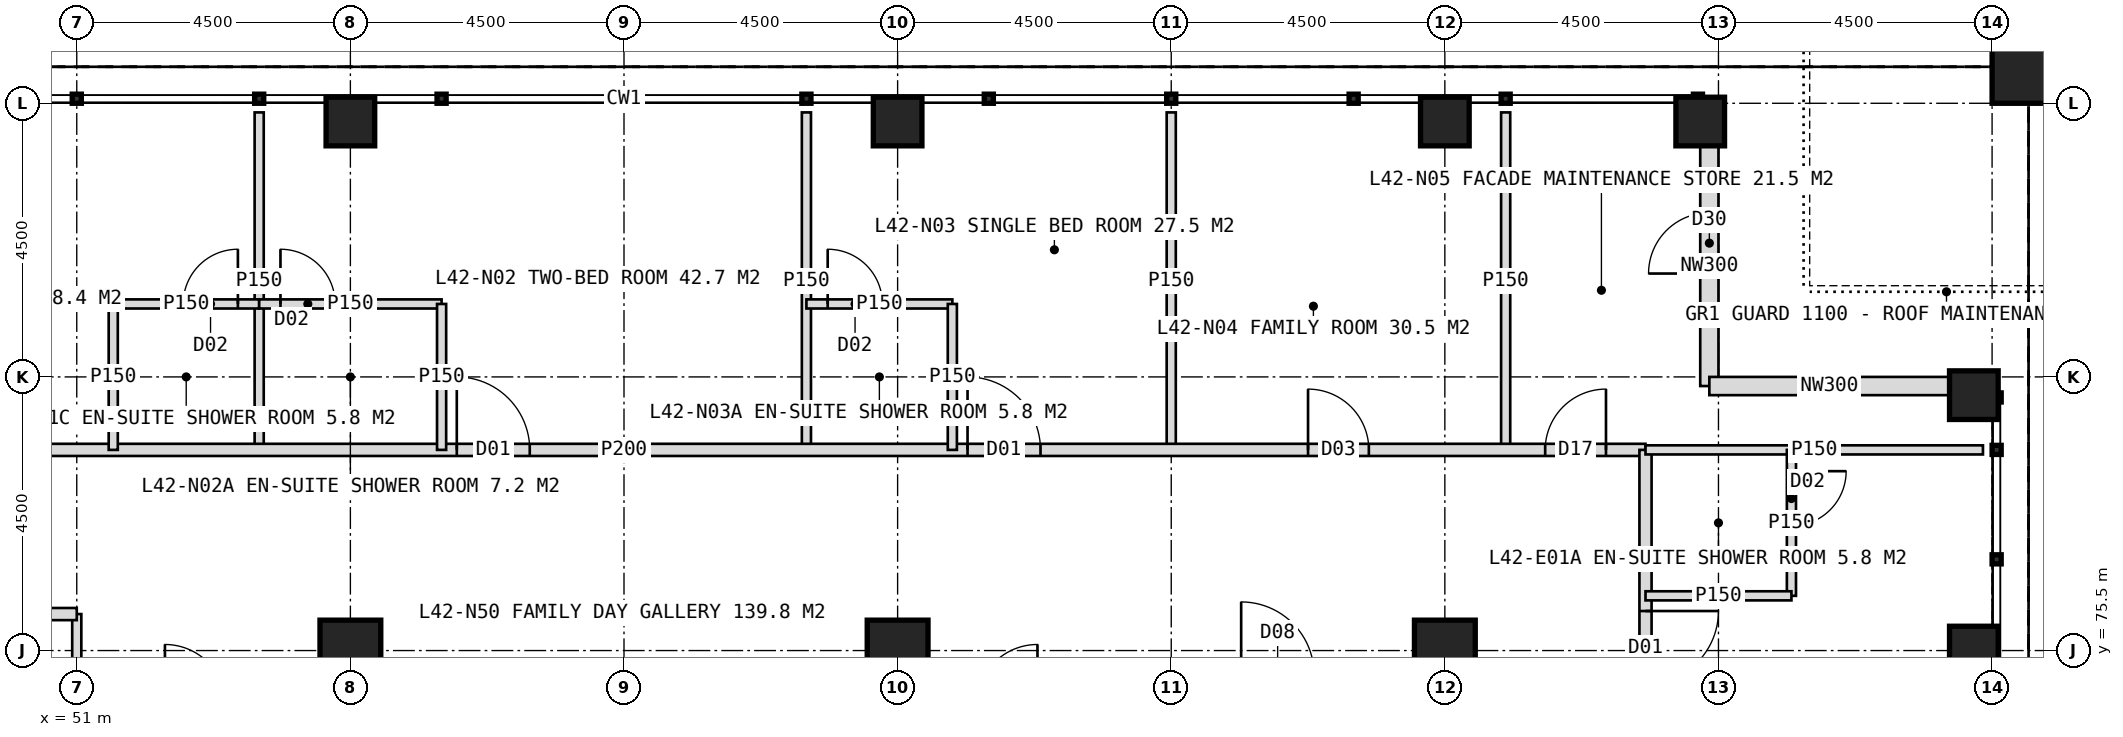
"""IFC4 building model, lengths in metres.
Left out: names, types, materials, properties, quantities, classifications, styles, units other than length and angle.
Written with IfcOpenShell. Run it as: python <this file> out.ifc"""

import sys

from ifc_helpers import new_model, si_unit, direction, frame, frame_2d, origin, origin_2d, place, context, subcontext, project, spatial, rectangle, hollow_rectangle, extrude, element, fill, save


model = new_model("IFC4")
c1 = context("Model", 3, precision=1e-05, world=origin(), true_north=direction((0.0, 1.0)))
c2 = subcontext(c1, "Body", "Model", "MODEL_VIEW")
j1 = project(units=[si_unit("LENGTHUNIT", "METRE"), si_unit("PLANEANGLEUNIT", "RADIAN")], contexts=[c1])
p1 = place(None, origin())
s1 = spatial("IfcSite", under=j1, at=p1, CompositionType="ELEMENT")
p2 = place(p1, origin())
s2 = spatial("IfcBuilding", under=s1, at=p2, CompositionType="ELEMENT")
p3 = place(p2, frame((0.0, 0.0, 177.0)))
s3 = spatial("IfcBuildingStorey", under=s2, at=p3, CompositionType="ELEMENT", Elevation=177.0)
for number, where, z_axis, x_axis in (
    (1, (73.5, 75.5, 0.0), (0.0, 0.0, 1.0), (1.0, 0.0, 0.0)),
    (2, (55.5, 75.5, 0.0), (0.0, 0.0, 1.0), (1.0, 0.0, 0.0)),
    (3, (64.5, 75.5, 0.0), (0.0, 0.0, 1.0), (1.0, 0.0, 0.0)),
):
    element("IfcColumn", number, at=place(p3, frame(where, z_axis=z_axis, x_axis=x_axis)), inside=s3, PredefinedType="COLUMN", context=c2, shape_type="SweptSolid", body=[
        extrude(hollow_rectangle(XDim=1.0, YDim=1.0, WallThickness=0.1, at=origin_2d()), origin(), (0.0, 0.0, 1.0), 4.0),
    ])
for number, where, z_axis, x_axis in (
    (4, (55.5, 84.2, 0.0), (0.0, 0.0, 1.0), (1.0, 0.0, 0.0)),
    (5, (64.5, 84.2, 0.0), (0.0, 0.0, 1.0), (1.0, 0.0, 0.0)),
    (6, (73.5, 84.2, 0.0), (0.0, 0.0, 1.0), (1.0, 0.0, 0.0)),
    (7, (82.2, 75.5, 0.0), (0.0, 0.0, 1.0), (1.0, 0.0, 0.0)),
    (8, (77.7, 84.2, 0.0), (0.0, 0.0, 1.0), (1.0, 0.0, 0.0)),
    (9, (82.2, 79.7, 0.0), (0.0, 0.0, 1.0), (1.0, 0.0, 0.0)),
):
    element("IfcColumn", number, at=place(p3, frame(where, z_axis=z_axis, x_axis=x_axis)), inside=s3, PredefinedType="COLUMN", context=c2, shape_type="SweptSolid", body=[
        extrude(hollow_rectangle(XDim=0.8, YDim=0.8, WallThickness=0.08, at=origin_2d()), origin(), (0.0, 0.0, 1.0), 4.0),
    ])
p4 = place(p3, frame((83.1, 85.1, 2.0), z_axis=(0.0, 0.0, 1.0), x_axis=(1.0, 0.0, 0.0)))
e10 = element("IfcColumn", 10, at=p4, inside=s3, PredefinedType="COLUMN", context=c2, shape_type="SweptSolid", body=[
    extrude(hollow_rectangle(XDim=1.2, YDim=1.2, WallThickness=0.07, at=origin_2d()), origin(), (0.0, 0.0, 1.0), 2.0),
])
p5 = place(p3, frame((77.85, 83.8, 0.0), z_axis=(0.0, 0.0, 1.0), x_axis=(0.0, -1.0, 0.0)))
e11 = element("IfcWall", 11, at=p5, inside=s3, PredefinedType="ELEMENTEDWALL", context=c2, shape_type="SweptSolid", body=[
    extrude(rectangle(XDim=3.95, YDim=0.3, at=frame_2d((1.975, 0.0))), origin(), (0.0, 0.0, 1.0), 2.85),
])
p6 = place(p5, frame((1.1, 0.0, 0.0)))
e12 = element("IfcOpeningElement", 12, at=p6, cuts=e11, PredefinedType="OPENING", context=c2, shape_type="SweptSolid", body=[
    extrude(rectangle(XDim=1.0, YDim=2.1, at=frame_2d((0.5, 1.05))), frame((0.0, 0.16, 0.0), z_axis=(0.0, -1.0, 0.0), x_axis=(1.0, 0.0, 0.0)), (0.0, 0.0, 1.0), 0.32),
])
p7 = place(p3, frame((77.85, 79.85, 0.0), z_axis=(0.0, 0.0, 1.0), x_axis=(1.0, 0.0, 0.0)))
e13 = element("IfcWall", 13, at=p7, inside=s3, PredefinedType="ELEMENTEDWALL", context=c2, shape_type="SweptSolid", body=[
    extrude(rectangle(XDim=3.95, YDim=0.3, at=frame_2d((1.975, 0.0))), origin(), (0.0, 0.0, 1.0), 2.85),
])
for number, where, z_axis, x_axis in (
    (14, (54.0, 78.8, 0.0), (0.0, 0.0, 1.0), (0.0, 1.0, 0.0)),
    (15, (63.0, 78.8, 0.0), (0.0, 0.0, 1.0), (0.0, 1.0, 0.0)),
    (16, (69.0, 78.8, 0.0), (0.0, 0.0, 1.0), (0.0, 1.0, 0.0)),
    (17, (74.5, 78.8, 0.0), (0.0, 0.0, 1.0), (0.0, 1.0, 0.0)),
):
    element("IfcWall", number, at=place(p3, frame(where, z_axis=z_axis, x_axis=x_axis)), inside=s3, PredefinedType="PARTITIONING", context=c2, shape_type="SweptSolid", body=[
        extrude(rectangle(XDim=5.55, YDim=0.15, at=frame_2d((2.775, 0.0))), origin(), (0.0, 0.0, 1.0), 3.75),
    ])
p8 = place(p3, frame((43.2, 78.8, 0.0), z_axis=(0.0, 0.0, 1.0), x_axis=(1.0, 0.0, 0.0)))
e18 = element("IfcWall", 18, at=p8, inside=s3, PredefinedType="PARTITIONING", context=c2, shape_type="SweptSolid", body=[
    extrude(rectangle(XDim=33.6, YDim=0.2, at=frame_2d((16.8, 0.0))), origin(), (0.0, 0.0, 1.0), 3.75),
])
p9 = place(p8, frame((2.65, 0.0, 0.0)))
e19 = element("IfcOpeningElement", 19, at=p9, cuts=e18, PredefinedType="OPENING", context=c2, shape_type="SweptSolid", body=[
    extrude(rectangle(XDim=1.2, YDim=2.2, at=frame_2d((0.6, 1.1))), frame((0.0, 0.11, 0.0), z_axis=(0.0, -1.0, 0.0), x_axis=(1.0, 0.0, 0.0)), (0.0, 0.0, 1.0), 0.22),
])
p10 = place(p8, frame((14.05, 0.0, 0.0)))
e20 = element("IfcOpeningElement", 20, at=p10, cuts=e18, PredefinedType="OPENING", context=c2, shape_type="SweptSolid", body=[
    extrude(rectangle(XDim=1.2, YDim=2.2, at=frame_2d((0.6, 1.1))), frame((0.0, 0.11, 0.0), z_axis=(0.0, -1.0, 0.0), x_axis=(1.0, 0.0, 0.0)), (0.0, 0.0, 1.0), 0.22),
])
p11 = place(p8, frame((22.45, 0.0, 0.0)))
e21 = element("IfcOpeningElement", 21, at=p11, cuts=e18, PredefinedType="OPENING", context=c2, shape_type="SweptSolid", body=[
    extrude(rectangle(XDim=1.2, YDim=2.2, at=frame_2d((0.6, 1.1))), frame((0.0, 0.11, 0.0), z_axis=(0.0, -1.0, 0.0), x_axis=(1.0, 0.0, 0.0)), (0.0, 0.0, 1.0), 0.22),
])
p12 = place(p8, frame((28.05, 0.0, 0.0)))
e22 = element("IfcOpeningElement", 22, at=p12, cuts=e18, PredefinedType="OPENING", context=c2, shape_type="SweptSolid", body=[
    extrude(rectangle(XDim=1.0, YDim=2.1, at=frame_2d((0.5, 1.05))), frame((0.0, 0.11, 0.0), z_axis=(0.0, -1.0, 0.0), x_axis=(1.0, 0.0, 0.0)), (0.0, 0.0, 1.0), 0.22),
])
p13 = place(p8, frame((31.95, 0.0, 0.0)))
e23 = element("IfcOpeningElement", 23, at=p13, cuts=e18, PredefinedType="OPENING", context=c2, shape_type="SweptSolid", body=[
    extrude(rectangle(XDim=1.0, YDim=2.1, at=frame_2d((0.5, 1.05))), frame((0.0, 0.11, 0.0), z_axis=(0.0, -1.0, 0.0), x_axis=(1.0, 0.0, 0.0)), (0.0, 0.0, 1.0), 0.22),
])
p14 = place(p3, frame((51.6, 81.2, 0.0), z_axis=(0.0, 0.0, 1.0), x_axis=(1.0, 0.0, 0.0)))
e24 = element("IfcWall", 24, at=p14, inside=s3, PredefinedType="PARTITIONING", context=c2, shape_type="SweptSolid", body=[
    extrude(rectangle(XDim=2.4, YDim=0.15, at=frame_2d((1.2, 0.0))), origin(), (0.0, 0.0, 1.0), 3.75),
])
p15 = place(p14, frame((1.15, 0.0, 0.0)))
e25 = element("IfcOpeningElement", 25, at=p15, cuts=e24, PredefinedType="OPENING", context=c2, shape_type="SweptSolid", body=[
    extrude(rectangle(XDim=0.9, YDim=2.1, at=frame_2d((0.45, 1.05))), frame((0.0, 0.085, 0.0), z_axis=(0.0, -1.0, 0.0), x_axis=(1.0, 0.0, 0.0)), (0.0, 0.0, 1.0), 0.17),
])
p16 = place(p3, frame((51.6, 78.8, 0.0), z_axis=(0.0, 0.0, 1.0), x_axis=(0.0, 1.0, 0.0)))
e26 = element("IfcWall", 26, at=p16, inside=s3, PredefinedType="PARTITIONING", context=c2, shape_type="SweptSolid", body=[
    extrude(rectangle(XDim=2.4, YDim=0.15, at=frame_2d((1.2, 0.0))), origin(), (0.0, 0.0, 1.0), 3.75),
])
p17 = place(p3, frame((54.0, 81.2, 0.0), z_axis=(0.0, 0.0, 1.0), x_axis=(1.0, 0.0, 0.0)))
e27 = element("IfcWall", 27, at=p17, inside=s3, PredefinedType="PARTITIONING", context=c2, shape_type="SweptSolid", body=[
    extrude(rectangle(XDim=3.0, YDim=0.15, at=frame_2d((1.5, 0.0))), origin(), (0.0, 0.0, 1.0), 3.75),
])
p18 = place(p17, frame((0.35, 0.0, 0.0)))
e28 = element("IfcOpeningElement", 28, at=p18, cuts=e27, PredefinedType="OPENING", context=c2, shape_type="SweptSolid", body=[
    extrude(rectangle(XDim=0.9, YDim=2.1, at=frame_2d((0.45, 1.05))), frame((0.0, 0.085, 0.0), z_axis=(0.0, -1.0, 0.0), x_axis=(1.0, 0.0, 0.0)), (0.0, 0.0, 1.0), 0.17),
])
p19 = place(p3, frame((57.0, 78.8, 0.0), z_axis=(0.0, 0.0, 1.0), x_axis=(0.0, 1.0, 0.0)))
e29 = element("IfcWall", 29, at=p19, inside=s3, PredefinedType="PARTITIONING", context=c2, shape_type="SweptSolid", body=[
    extrude(rectangle(XDim=2.4, YDim=0.15, at=frame_2d((1.2, 0.0))), origin(), (0.0, 0.0, 1.0), 3.75),
])
p20 = place(p3, frame((63.0, 81.2, 0.0), z_axis=(0.0, 0.0, 1.0), x_axis=(1.0, 0.0, 0.0)))
e30 = element("IfcWall", 30, at=p20, inside=s3, PredefinedType="PARTITIONING", context=c2, shape_type="SweptSolid", body=[
    extrude(rectangle(XDim=2.4, YDim=0.15, at=frame_2d((1.2, 0.0))), origin(), (0.0, 0.0, 1.0), 3.75),
])
p21 = place(p20, frame((0.35, 0.0, 0.0)))
e31 = element("IfcOpeningElement", 31, at=p21, cuts=e30, PredefinedType="OPENING", context=c2, shape_type="SweptSolid", body=[
    extrude(rectangle(XDim=0.9, YDim=2.1, at=frame_2d((0.45, 1.05))), frame((0.0, 0.085, 0.0), z_axis=(0.0, -1.0, 0.0), x_axis=(1.0, 0.0, 0.0)), (0.0, 0.0, 1.0), 0.17),
])
p22 = place(p3, frame((65.4, 78.8, 0.0), z_axis=(0.0, 0.0, 1.0), x_axis=(0.0, 1.0, 0.0)))
e32 = element("IfcWall", 32, at=p22, inside=s3, PredefinedType="PARTITIONING", context=c2, shape_type="SweptSolid", body=[
    extrude(rectangle(XDim=2.4, YDim=0.15, at=frame_2d((1.2, 0.0))), origin(), (0.0, 0.0, 1.0), 3.75),
])
p23 = place(p3, frame((51.0, 71.0, 0.0), z_axis=(0.0, 0.0, 1.0), x_axis=(0.0, 1.0, 0.0)))
e33 = element("IfcWall", 33, at=p23, inside=s3, PredefinedType="PARTITIONING", context=c2, shape_type="SweptSolid", body=[
    extrude(rectangle(XDim=5.1, YDim=0.15, at=frame_2d((2.55, 0.0))), origin(), (0.0, 0.0, 1.0), 3.75),
])
p24 = place(p3, frame((45.9, 76.1, 0.0), z_axis=(0.0, 0.0, 1.0), x_axis=(1.0, 0.0, 0.0)))
e34 = element("IfcWall", 34, at=p24, inside=s3, PredefinedType="PARTITIONING", context=c2, shape_type="SweptSolid", body=[
    extrude(rectangle(XDim=5.1, YDim=0.2, at=frame_2d((2.55, 0.0))), origin(), (0.0, 0.0, 1.0), 3.75),
])
p25 = place(p3, frame((76.8, 78.8, 0.0), z_axis=(0.0, 0.0, 1.0), x_axis=(0.0, -1.0, 0.0)))
e35 = element("IfcWall", 35, at=p25, inside=s3, PredefinedType="PARTITIONING", context=c2, shape_type="SweptSolid", body=[
    extrude(rectangle(XDim=33.6, YDim=0.2, at=frame_2d((16.8, 0.0))), origin(), (0.0, 0.0, 1.0), 3.75),
])
p26 = place(p25, frame((2.65, 0.0, 0.0)))
e36 = element("IfcOpeningElement", 36, at=p26, cuts=e35, PredefinedType="OPENING", context=c2, shape_type="SweptSolid", body=[
    extrude(rectangle(XDim=1.2, YDim=2.2, at=frame_2d((0.6, 1.1))), frame((0.0, 0.11, 0.0), z_axis=(0.0, -1.0, 0.0), x_axis=(1.0, 0.0, 0.0)), (0.0, 0.0, 1.0), 0.22),
])
p27 = place(p25, frame((7.45, 0.0, 0.0)))
e37 = element("IfcOpeningElement", 37, at=p27, cuts=e35, PredefinedType="OPENING", context=c2, shape_type="SweptSolid", body=[
    extrude(rectangle(XDim=1.2, YDim=2.2, at=frame_2d((0.6, 1.1))), frame((0.0, 0.11, 0.0), z_axis=(0.0, -1.0, 0.0), x_axis=(1.0, 0.0, 0.0)), (0.0, 0.0, 1.0), 0.22),
])
p28 = place(p25, frame((13.45, 0.0, 0.0)))
e38 = element("IfcOpeningElement", 38, at=p28, cuts=e35, PredefinedType="OPENING", context=c2, shape_type="SweptSolid", body=[
    extrude(rectangle(XDim=1.2, YDim=2.2, at=frame_2d((0.6, 1.1))), frame((0.0, 0.11, 0.0), z_axis=(0.0, -1.0, 0.0), x_axis=(1.0, 0.0, 0.0)), (0.0, 0.0, 1.0), 0.22),
])
p29 = place(p25, frame((19.45, 0.0, 0.0)))
e39 = element("IfcOpeningElement", 39, at=p29, cuts=e35, PredefinedType="OPENING", context=c2, shape_type="SweptSolid", body=[
    extrude(rectangle(XDim=1.2, YDim=2.2, at=frame_2d((0.6, 1.1))), frame((0.0, 0.11, 0.0), z_axis=(0.0, -1.0, 0.0), x_axis=(1.0, 0.0, 0.0)), (0.0, 0.0, 1.0), 0.22),
])
p30 = place(p25, frame((25.45, 0.0, 0.0)))
e40 = element("IfcOpeningElement", 40, at=p30, cuts=e35, PredefinedType="OPENING", context=c2, shape_type="SweptSolid", body=[
    extrude(rectangle(XDim=1.2, YDim=2.2, at=frame_2d((0.6, 1.1))), frame((0.0, 0.11, 0.0), z_axis=(0.0, -1.0, 0.0), x_axis=(1.0, 0.0, 0.0)), (0.0, 0.0, 1.0), 0.22),
])
p31 = place(p3, frame((76.8, 78.8, 0.0), z_axis=(0.0, 0.0, 1.0), x_axis=(1.0, 0.0, 0.0)))
e41 = element("IfcWall", 41, at=p31, inside=s3, PredefinedType="PARTITIONING", context=c2, shape_type="SweptSolid", body=[
    extrude(rectangle(XDim=5.55, YDim=0.15, at=frame_2d((2.775, 0.0))), origin(), (0.0, 0.0, 1.0), 3.75),
])
p32 = place(p3, frame((79.2, 78.8, 0.0), z_axis=(0.0, 0.0, 1.0), x_axis=(0.0, -1.0, 0.0)))
e42 = element("IfcWall", 42, at=p32, inside=s3, PredefinedType="PARTITIONING", context=c2, shape_type="SweptSolid", body=[
    extrude(rectangle(XDim=2.4, YDim=0.15, at=frame_2d((1.2, 0.0))), origin(), (0.0, 0.0, 1.0), 3.75),
])
p33 = place(p32, frame((0.35, 0.0, 0.0)))
e43 = element("IfcOpeningElement", 43, at=p33, cuts=e42, PredefinedType="OPENING", context=c2, shape_type="SweptSolid", body=[
    extrude(rectangle(XDim=0.9, YDim=2.1, at=frame_2d((0.45, 1.05))), frame((0.0, 0.085, 0.0), z_axis=(0.0, -1.0, 0.0), x_axis=(1.0, 0.0, 0.0)), (0.0, 0.0, 1.0), 0.17),
])
p34 = place(p3, frame((76.8, 76.4, 0.0), z_axis=(0.0, 0.0, 1.0), x_axis=(1.0, 0.0, 0.0)))
e44 = element("IfcWall", 44, at=p34, inside=s3, PredefinedType="PARTITIONING", context=c2, shape_type="SweptSolid", body=[
    extrude(rectangle(XDim=2.4, YDim=0.15, at=frame_2d((1.2, 0.0))), origin(), (0.0, 0.0, 1.0), 3.75),
])
p35 = place(p15, origin())
e45 = element("IfcDoor", 45, at=p35, inside=s3, OperationType="SINGLE_SWING_RIGHT", PredefinedType="DOOR", context=c2, shape_type="SweptSolid", body=[
    extrude(rectangle(XDim=0.9, YDim=2.1, at=frame_2d((0.45, 1.05))), frame((0.0, 0.025, 0.0), z_axis=(0.0, -1.0, 0.0), x_axis=(1.0, 0.0, 0.0)), (0.0, 0.0, 1.0), 0.05),
])
fill(e25, e45)
p36 = place(p10, origin())
e46 = element("IfcDoor", 46, at=p36, inside=s3, OperationType="SINGLE_SWING_LEFT", PredefinedType="DOOR", context=c2, shape_type="SweptSolid", body=[
    extrude(rectangle(XDim=1.2, YDim=2.2, at=frame_2d((0.6, 1.1))), frame((0.0, 0.025, 0.0), z_axis=(0.0, -1.0, 0.0), x_axis=(1.0, 0.0, 0.0)), (0.0, 0.0, 1.0), 0.05),
])
fill(e20, e46)
p37 = place(p18, origin())
e47 = element("IfcDoor", 47, at=p37, inside=s3, OperationType="SINGLE_SWING_LEFT", PredefinedType="DOOR", context=c2, shape_type="SweptSolid", body=[
    extrude(rectangle(XDim=0.9, YDim=2.1, at=frame_2d((0.45, 1.05))), frame((0.0, 0.025, 0.0), z_axis=(0.0, -1.0, 0.0), x_axis=(1.0, 0.0, 0.0)), (0.0, 0.0, 1.0), 0.05),
])
fill(e28, e47)
p38 = place(p11, origin())
e48 = element("IfcDoor", 48, at=p38, inside=s3, OperationType="SINGLE_SWING_LEFT", PredefinedType="DOOR", context=c2, shape_type="SweptSolid", body=[
    extrude(rectangle(XDim=1.2, YDim=2.2, at=frame_2d((0.6, 1.1))), frame((0.0, 0.025, 0.0), z_axis=(0.0, -1.0, 0.0), x_axis=(1.0, 0.0, 0.0)), (0.0, 0.0, 1.0), 0.05),
])
fill(e21, e48)
p39 = place(p21, origin())
e49 = element("IfcDoor", 49, at=p39, inside=s3, OperationType="SINGLE_SWING_LEFT", PredefinedType="DOOR", context=c2, shape_type="SweptSolid", body=[
    extrude(rectangle(XDim=0.9, YDim=2.1, at=frame_2d((0.45, 1.05))), frame((0.0, 0.025, 0.0), z_axis=(0.0, -1.0, 0.0), x_axis=(1.0, 0.0, 0.0)), (0.0, 0.0, 1.0), 0.05),
])
fill(e31, e49)
p40 = place(p12, origin())
e50 = element("IfcDoor", 50, at=p40, inside=s3, OperationType="SINGLE_SWING_LEFT", PredefinedType="DOOR", context=c2, shape_type="SweptSolid", body=[
    extrude(rectangle(XDim=1.0, YDim=2.1, at=frame_2d((0.5, 1.05))), frame((0.0, 0.025, 0.0), z_axis=(0.0, -1.0, 0.0), x_axis=(1.0, 0.0, 0.0)), (0.0, 0.0, 1.0), 0.05),
])
fill(e22, e50)
p41 = place(p13, origin())
e51 = element("IfcDoor", 51, at=p41, inside=s3, OperationType="SINGLE_SWING_RIGHT", PredefinedType="DOOR", context=c2, shape_type="SweptSolid", body=[
    extrude(rectangle(XDim=1.0, YDim=2.1, at=frame_2d((0.5, 1.05))), frame((0.0, 0.025, 0.0), z_axis=(0.0, -1.0, 0.0), x_axis=(1.0, 0.0, 0.0)), (0.0, 0.0, 1.0), 0.05),
])
fill(e23, e51)
p42 = place(p26, origin())
e52 = element("IfcDoor", 52, at=p42, inside=s3, OperationType="SINGLE_SWING_LEFT", PredefinedType="DOOR", context=c2, shape_type="SweptSolid", body=[
    extrude(rectangle(XDim=1.2, YDim=2.2, at=frame_2d((0.6, 1.1))), frame((0.0, 0.025, 0.0), z_axis=(0.0, -1.0, 0.0), x_axis=(1.0, 0.0, 0.0)), (0.0, 0.0, 1.0), 0.05),
])
fill(e36, e52)
p43 = place(p33, origin())
e53 = element("IfcDoor", 53, at=p43, inside=s3, OperationType="SINGLE_SWING_LEFT", PredefinedType="DOOR", context=c2, shape_type="SweptSolid", body=[
    extrude(rectangle(XDim=0.9, YDim=2.1, at=frame_2d((0.45, 1.05))), frame((0.0, 0.025, 0.0), z_axis=(0.0, -1.0, 0.0), x_axis=(1.0, 0.0, 0.0)), (0.0, 0.0, 1.0), 0.05),
])
fill(e43, e53)
p44 = place(p6, frame((1.0, 0.0, 0.0), z_axis=(0.0, 0.0, 1.0), x_axis=(-1.0, 0.0, 0.0)))
e54 = element("IfcDoor", 54, at=p44, inside=s3, OperationType="SINGLE_SWING_LEFT", PredefinedType="DOOR", context=c2, shape_type="SweptSolid", body=[
    extrude(rectangle(XDim=1.0, YDim=2.1, at=frame_2d((0.5, 1.05))), frame((0.0, 0.025, 0.0), z_axis=(0.0, -1.0, 0.0), x_axis=(1.0, 0.0, 0.0)), (0.0, 0.0, 1.0), 0.05),
])
fill(e12, e54)
save(model, sys.argv[1])
